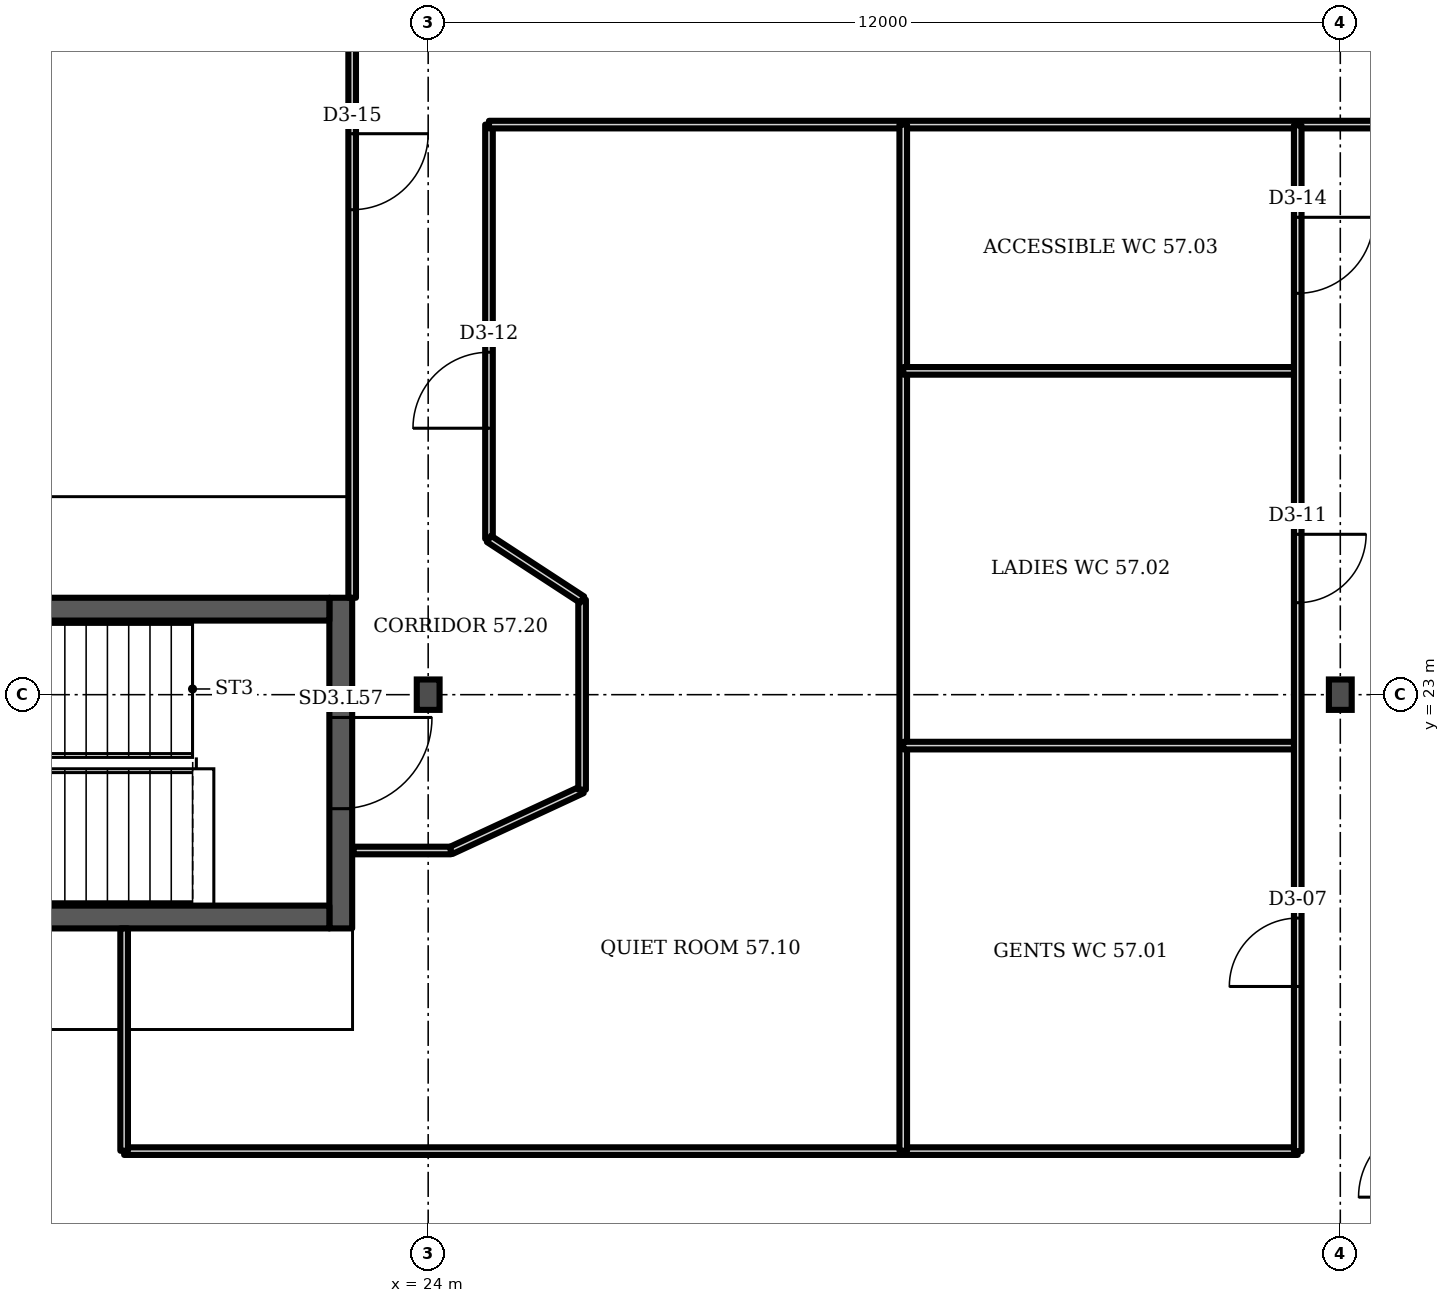
"""IFC4 building model, lengths in metres.
Left out: names, types, materials, properties, quantities, classifications, styles, units other than length and angle.
Written with IfcOpenShell. Run it as: python <this file> out.ifc"""

import sys

from ifc_helpers import new_model, si_unit, direction, frame, frame_2d, origin, origin_2d, place, context, subcontext, project, spatial, rectangle, i_section, extrude, element, fill, save


model = new_model("IFC4")
c1 = context("Model", 3, precision=1e-05, world=origin(), true_north=direction((0.0, 1.0)))
c2 = subcontext(c1, "Body", "Model", "MODEL_VIEW")
j1 = project(units=[si_unit("LENGTHUNIT", "METRE"), si_unit("PLANEANGLEUNIT", "RADIAN")], contexts=[c1])
p1 = place(None, origin())
s1 = spatial("IfcSite", under=j1, at=p1, CompositionType="ELEMENT")
p2 = place(p1, origin())
s2 = spatial("IfcBuilding", under=s1, at=p2, CompositionType="ELEMENT")
p3 = place(p2, frame((0.0, 0.0, 228.7)))
s3 = spatial("IfcBuildingStorey", under=s2, at=p3, CompositionType="ELEMENT", Elevation=228.7)
for number, where, z_axis, x_axis in (
    (1, (24.0, 23.0, 0.0), (0.0, 0.0, 1.0), (1.0, 0.0, 0.0)),
    (2, (36.0, 23.0, 0.0), (0.0, 0.0, 1.0), (1.0, 0.0, 0.0)),
):
    element("IfcColumn", number, at=place(p3, frame(where, z_axis=z_axis, x_axis=x_axis)), inside=s3, PredefinedType="COLUMN", context=c2, shape_type="SweptSolid", body=[
        extrude(i_section(OverallWidth=0.3, OverallDepth=0.4, WebThickness=0.013, FlangeThickness=0.024, FilletRadius=0.027, at=origin_2d()), origin(), (0.0, 0.0, 1.0), 3.6),
    ])
p4 = place(p3, frame((22.85, 19.925, 0.0), z_axis=(0.0, 0.0, 1.0), x_axis=(0.0, 1.0, 0.0)))
e3 = element("IfcWall", 3, at=p4, inside=s3, PredefinedType="SHEAR", context=c2, shape_type="SweptSolid", body=[
    extrude(rectangle(XDim=4.35, YDim=0.3, at=frame_2d((2.175, 0.0))), origin(), (0.0, 0.0, 1.0), 3.2),
])
p5 = place(p4, frame((1.575, 0.0, 0.0)))
e4 = element("IfcOpeningElement", 4, at=p5, cuts=e3, PredefinedType="OPENING", context=c2, shape_type="SweptSolid", body=[
    extrude(rectangle(XDim=1.2, YDim=2.1, at=frame_2d((0.6, 1.05))), frame((0.0, 0.16, 0.0), z_axis=(0.0, -1.0, 0.0), x_axis=(1.0, 0.0, 0.0)), (0.0, 0.0, 1.0), 0.32),
])
p6 = place(p3, frame((20.0, 16.995, 0.0), z_axis=(0.0, 0.0, 1.0), x_axis=(1.0, 0.0, 0.0)))
e5 = element("IfcWall", 5, at=p6, inside=s3, PredefinedType="PARTITIONING", context=c2, shape_type="SweptSolid", body=[
    extrude(rectangle(XDim=15.44, YDim=0.1, at=frame_2d((7.72, 0.0))), origin(), (0.0, 0.0, 1.0), 3.2),
])
p7 = place(p3, frame((20.0, 17.0, 0.0), z_axis=(0.0, 0.0, 1.0), x_axis=(0.0, 1.0, 0.0)))
e6 = element("IfcWall", 6, at=p7, inside=s3, PredefinedType="PARTITIONING", context=c2, shape_type="SweptSolid", body=[
    extrude(rectangle(XDim=2.925, YDim=0.1, at=frame_2d((1.462, 0.0))), origin(), (0.0, 0.0, 1.0), 3.2),
])
p8 = place(p3, frame((23.0, 24.275, 0.0), z_axis=(0.0, 0.0, 1.0), x_axis=(0.0, 1.0, 0.0)))
e7 = element("IfcWall", 7, at=p8, inside=s3, PredefinedType="PARTITIONING", context=c2, shape_type="SweptSolid", body=[
    extrude(rectangle(XDim=9.705, YDim=0.1, at=frame_2d((4.853, 0.0))), origin(), (0.0, 0.0, 1.0), 3.2),
])
p9 = place(p8, frame((5.105, 0.0, 0.0)))
e8 = element("IfcOpeningElement", 8, at=p9, cuts=e7, PredefinedType="OPENING", context=c2, shape_type="SweptSolid", body=[
    extrude(rectangle(XDim=1.0, YDim=2.1, at=frame_2d((0.5, 1.05))), frame((0.0, 0.06, 0.0), z_axis=(0.0, -1.0, 0.0), x_axis=(1.0, 0.0, 0.0)), (0.0, 0.0, 1.0), 0.12),
])
p10 = place(p3, frame((23.02, 20.95, 0.0), z_axis=(0.0, 0.0, 1.0), x_axis=(1.0, 0.0, 0.0)))
e9 = element("IfcWall", 9, at=p10, inside=s3, PredefinedType="PARTITIONING", context=c2, shape_type="SweptSolid", body=[
    extrude(rectangle(XDim=1.28, YDim=0.1, at=frame_2d((0.64, 0.0))), origin(), (0.0, 0.0, 1.0), 3.2),
])
p11 = place(p3, frame((24.3, 20.95, 0.0), z_axis=(0.0, 0.0, 1.0), x_axis=(0.907168, 0.420777, 0.0)))
e10 = element("IfcWall", 10, at=p11, inside=s3, PredefinedType="PARTITIONING", context=c2, shape_type="SweptSolid", body=[
    extrude(rectangle(XDim=1.901, YDim=0.1, at=frame_2d((0.951, 0.0))), origin(), (0.0, 0.0, 1.0), 3.2),
])
p12 = place(p3, frame((24.8, 25.05, 0.0), z_axis=(0.0, 0.0, 1.0), x_axis=(0.0, 1.0, 0.0)))
e11 = element("IfcWall", 11, at=p12, inside=s3, PredefinedType="PARTITIONING", context=c2, shape_type="SweptSolid", body=[
    extrude(rectangle(XDim=5.45, YDim=0.1, at=frame_2d((2.725, 0.0))), origin(), (0.0, 0.0, 1.0), 3.2),
])
p13 = place(p12, frame((1.455, 0.0, 0.0)))
e12 = element("IfcOpeningElement", 12, at=p13, cuts=e11, PredefinedType="OPENING", context=c2, shape_type="SweptSolid", body=[
    extrude(rectangle(XDim=1.0, YDim=2.1, at=frame_2d((0.5, 1.05))), frame((0.0, 0.06, 0.0), z_axis=(0.0, -1.0, 0.0), x_axis=(1.0, 0.0, 0.0)), (0.0, 0.0, 1.0), 0.12),
])
p14 = place(p3, frame((24.8, 30.5, 0.0), z_axis=(0.0, 0.0, 1.0), x_axis=(1.0, 0.0, 0.0)))
e13 = element("IfcWall", 13, at=p14, inside=s3, PredefinedType="PARTITIONING", context=c2, shape_type="SweptSolid", body=[
    extrude(rectangle(XDim=12.05, YDim=0.1, at=frame_2d((6.025, 0.0))), origin(), (0.0, 0.0, 1.0), 3.2),
])
p15 = place(p3, frame((26.025, 21.75, 0.0), z_axis=(0.0, 0.0, 1.0), x_axis=(0.0, 1.0, 0.0)))
e14 = element("IfcWall", 14, at=p15, inside=s3, PredefinedType="PARTITIONING", context=c2, shape_type="SweptSolid", body=[
    extrude(rectangle(XDim=2.5, YDim=0.1, at=frame_2d((1.25, 0.0))), origin(), (0.0, 0.0, 1.0), 3.2),
])
p16 = place(p3, frame((26.025, 24.25, 0.0), z_axis=(0.0, 0.0, 1.0), x_axis=(-0.837222, 0.546856, 0.0)))
e15 = element("IfcWall", 15, at=p16, inside=s3, PredefinedType="PARTITIONING", context=c2, shape_type="SweptSolid", body=[
    extrude(rectangle(XDim=1.463, YDim=0.1, at=frame_2d((0.731, 0.0))), origin(), (0.0, 0.0, 1.0), 3.2),
])
p17 = place(p3, frame((30.25, 17.0, 0.0), z_axis=(0.0, 0.0, 1.0), x_axis=(0.0, 1.0, 0.0)))
e16 = element("IfcWall", 16, at=p17, inside=s3, PredefinedType="PARTITIONING", context=c2, shape_type="SweptSolid", body=[
    extrude(rectangle(XDim=13.5, YDim=0.1, at=frame_2d((6.75, 0.0))), origin(), (0.0, 0.0, 1.0), 3.2),
])
for number, where, z_axis, x_axis in (
    (17, (30.25, 22.33, 0.0), (0.0, 0.0, 1.0), (1.0, 0.0, 0.0)),
    (18, (30.25, 27.26, 0.0), (0.0, 0.0, 1.0), (1.0, 0.0, 0.0)),
):
    element("IfcWall", number, at=place(p3, frame(where, z_axis=z_axis, x_axis=x_axis)), inside=s3, PredefinedType="PARTITIONING", context=c2, shape_type="SweptSolid", body=[
        extrude(rectangle(XDim=5.19, YDim=0.1, at=frame_2d((2.595, 0.0))), origin(), (0.0, 0.0, 1.0), 3.2),
    ])
p18 = place(p3, frame((35.44, 16.995, 0.0), z_axis=(0.0, 0.0, 1.0), x_axis=(0.0, 1.0, 0.0)))
e19 = element("IfcWall", 19, at=p18, inside=s3, PredefinedType="PARTITIONING", context=c2, shape_type="SweptSolid", body=[
    extrude(rectangle(XDim=13.495, YDim=0.1, at=frame_2d((6.748, 0.0))), origin(), (0.0, 0.0, 1.0), 3.2),
])
p19 = place(p18, frame((2.166, 0.0, 0.0)))
e20 = element("IfcOpeningElement", 20, at=p19, cuts=e19, PredefinedType="OPENING", context=c2, shape_type="SweptSolid", body=[
    extrude(rectangle(XDim=0.9, YDim=2.1, at=frame_2d((0.45, 1.05))), frame((0.0, 0.06, 0.0), z_axis=(0.0, -1.0, 0.0), x_axis=(1.0, 0.0, 0.0)), (0.0, 0.0, 1.0), 0.12),
])
p20 = place(p18, frame((7.215, 0.0, 0.0)))
e21 = element("IfcOpeningElement", 21, at=p20, cuts=e19, PredefinedType="OPENING", context=c2, shape_type="SweptSolid", body=[
    extrude(rectangle(XDim=0.9, YDim=2.1, at=frame_2d((0.45, 1.05))), frame((0.0, 0.06, 0.0), z_axis=(0.0, -1.0, 0.0), x_axis=(1.0, 0.0, 0.0)), (0.0, 0.0, 1.0), 0.12),
])
p21 = place(p18, frame((11.285, 0.0, 0.0)))
e22 = element("IfcOpeningElement", 22, at=p21, cuts=e19, PredefinedType="OPENING", context=c2, shape_type="SweptSolid", body=[
    extrude(rectangle(XDim=1.0, YDim=2.1, at=frame_2d((0.5, 1.05))), frame((0.0, 0.06, 0.0), z_axis=(0.0, -1.0, 0.0), x_axis=(1.0, 0.0, 0.0)), (0.0, 0.0, 1.0), 0.12),
])
for number, where, z_axis, x_axis in (
    (23, (15.2, 20.075, 0.0), (0.0, 0.0, 1.0), (1.0, 0.0, 0.0)),
    (24, (15.2, 24.125, 0.0), (0.0, 0.0, 1.0), (1.0, 0.0, 0.0)),
):
    element("IfcWall", number, at=place(p3, frame(where, z_axis=z_axis, x_axis=x_axis)), inside=s3, PredefinedType="SHEAR", context=c2, shape_type="SweptSolid", body=[
        extrude(rectangle(XDim=7.5, YDim=0.3, at=frame_2d((3.75, 0.0))), origin(), (0.0, 0.0, 1.0), 3.2),
    ])
p22 = place(p5, origin())
e25 = element("IfcDoor", 25, at=p22, inside=s3, OperationType="SINGLE_SWING_RIGHT", PredefinedType="DOOR", context=c2, shape_type="SweptSolid", body=[
    extrude(rectangle(XDim=1.2, YDim=2.1, at=frame_2d((0.6, 1.05))), frame((0.0, 0.025, 0.0), z_axis=(0.0, -1.0, 0.0), x_axis=(1.0, 0.0, 0.0)), (0.0, 0.0, 1.0), 0.05),
])
fill(e4, e25)
p23 = place(p19, origin())
e26 = element("IfcDoor", 26, at=p23, inside=s3, OperationType="SINGLE_SWING_LEFT", PredefinedType="DOOR", context=c2, shape_type="SweptSolid", body=[
    extrude(rectangle(XDim=0.9, YDim=2.1, at=frame_2d((0.45, 1.05))), frame((0.0, 0.025, 0.0), z_axis=(0.0, -1.0, 0.0), x_axis=(1.0, 0.0, 0.0)), (0.0, 0.0, 1.0), 0.05),
])
fill(e20, e26)
p24 = place(p20, origin())
e27 = element("IfcDoor", 27, at=p24, inside=s3, OperationType="SINGLE_SWING_RIGHT", PredefinedType="DOOR", context=c2, shape_type="SweptSolid", body=[
    extrude(rectangle(XDim=0.9, YDim=2.1, at=frame_2d((0.45, 1.05))), frame((0.0, 0.025, 0.0), z_axis=(0.0, -1.0, 0.0), x_axis=(1.0, 0.0, 0.0)), (0.0, 0.0, 1.0), 0.05),
])
fill(e21, e27)
p25 = place(p13, origin())
e28 = element("IfcDoor", 28, at=p25, inside=s3, OperationType="SINGLE_SWING_LEFT", PredefinedType="DOOR", context=c2, shape_type="SweptSolid", body=[
    extrude(rectangle(XDim=1.0, YDim=2.1, at=frame_2d((0.5, 1.05))), frame((0.0, 0.025, 0.0), z_axis=(0.0, -1.0, 0.0), x_axis=(1.0, 0.0, 0.0)), (0.0, 0.0, 1.0), 0.05),
])
fill(e12, e28)
p26 = place(p21, origin())
e29 = element("IfcDoor", 29, at=p26, inside=s3, OperationType="SINGLE_SWING_RIGHT", PredefinedType="DOOR", context=c2, shape_type="SweptSolid", body=[
    extrude(rectangle(XDim=1.0, YDim=2.1, at=frame_2d((0.5, 1.05))), frame((0.0, 0.025, 0.0), z_axis=(0.0, -1.0, 0.0), x_axis=(1.0, 0.0, 0.0)), (0.0, 0.0, 1.0), 0.05),
])
fill(e22, e29)
p27 = place(p9, origin())
e30 = element("IfcDoor", 30, at=p27, inside=s3, OperationType="SINGLE_SWING_RIGHT", PredefinedType="DOOR", context=c2, shape_type="SweptSolid", body=[
    extrude(rectangle(XDim=1.0, YDim=2.1, at=frame_2d((0.5, 1.05))), frame((0.0, 0.025, 0.0), z_axis=(0.0, -1.0, 0.0), x_axis=(1.0, 0.0, 0.0)), (0.0, 0.0, 1.0), 0.05),
])
fill(e8, e30)
save(model, sys.argv[1])
